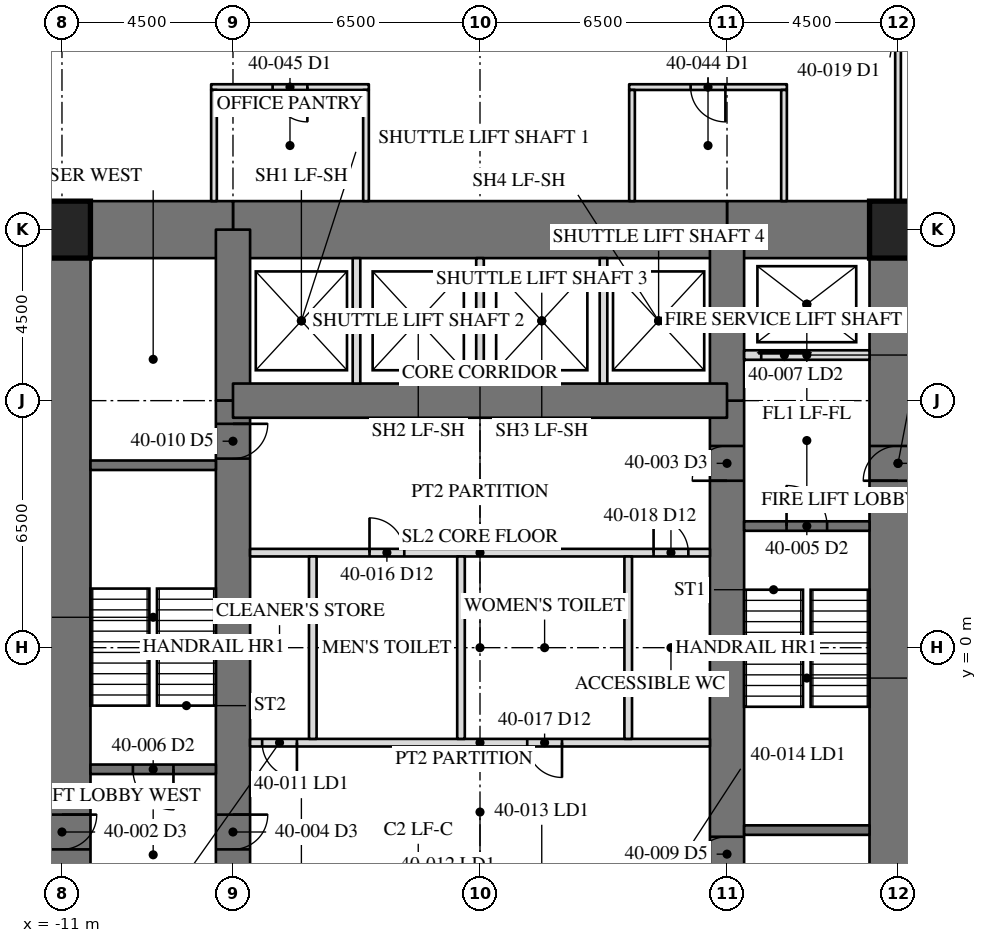
"""IFC4 building model, lengths in metres.
Left out: names, types, materials, properties, quantities, classifications, styles, units other than length and angle.
Written with IfcOpenShell. Run it as: python <this file> out.ifc"""

import sys

from ifc_helpers import new_model, si_unit, direction, frame, frame_2d, origin, origin_2d, place, context, subcontext, project, spatial, rectangle, hollow_rectangle, extrude, element, fill, save


model = new_model("IFC4")
c1 = context("Model", 3, precision=1e-05, world=origin(), true_north=direction((0.0, 1.0)))
c2 = subcontext(c1, "Body", "Model", "MODEL_VIEW")
j1 = project(units=[si_unit("LENGTHUNIT", "METRE"), si_unit("PLANEANGLEUNIT", "RADIAN")], contexts=[c1])
p1 = place(None, origin())
s1 = spatial("IfcSite", under=j1, at=p1, CompositionType="ELEMENT")
p2 = place(p1, origin())
s2 = spatial("IfcBuilding", under=s1, at=p2, CompositionType="ELEMENT")
p3 = place(p2, frame((0.0, 0.0, 170.5)))
s3 = spatial("IfcBuildingStorey", under=s2, at=p3, CompositionType="ELEMENT", Elevation=170.5)
p4 = place(p3, frame((11.0, -11.0, 0.0), z_axis=(0.0, 0.0, 1.0), x_axis=(0.0, 1.0, 0.0)))
e1 = element("IfcWall", 1, at=p4, inside=s3, PredefinedType="SHEAR", context=c2, shape_type="SweptSolid", body=[
    extrude(rectangle(XDim=22.0, YDim=1.5, at=frame_2d((11.0, 0.0))), origin(), (0.0, 0.0, 1.0), 4.1),
])
p5 = place(p4, frame((15.393, 0.0, 0.0)))
e2 = element("IfcOpeningElement", 2, at=p5, cuts=e1, PredefinedType="OPENING", context=c2, shape_type="SweptSolid", body=[
    extrude(rectangle(XDim=0.915, YDim=2.134, at=frame_2d((0.458, 1.067))), frame((0.0, 0.76, 0.0), z_axis=(0.0, -1.0, 0.0), x_axis=(1.0, 0.0, 0.0)), (0.0, 0.0, 1.0), 1.52),
])
p6 = place(p3, frame((-11.0, 11.0, 0.0), z_axis=(0.0, 0.0, 1.0), x_axis=(0.0, -1.0, 0.0)))
e3 = element("IfcWall", 3, at=p6, inside=s3, PredefinedType="SHEAR", context=c2, shape_type="SweptSolid", body=[
    extrude(rectangle(XDim=22.0, YDim=1.5, at=frame_2d((11.0, 0.0))), origin(), (0.0, 0.0, 1.0), 4.1),
])
p7 = place(p6, frame((15.393, 0.0, 0.0)))
e4 = element("IfcOpeningElement", 4, at=p7, cuts=e3, PredefinedType="OPENING", context=c2, shape_type="SweptSolid", body=[
    extrude(rectangle(XDim=0.915, YDim=2.134, at=frame_2d((0.458, 1.067))), frame((0.0, 0.76, 0.0), z_axis=(0.0, -1.0, 0.0), x_axis=(1.0, 0.0, 0.0)), (0.0, 0.0, 1.0), 1.52),
])
p8 = place(p3, frame((11.0, 11.0, 0.0), z_axis=(0.0, 0.0, 1.0), x_axis=(-1.0, 0.0, 0.0)))
e5 = element("IfcWall", 5, at=p8, inside=s3, PredefinedType="SHEAR", context=c2, shape_type="SweptSolid", body=[
    extrude(rectangle(XDim=4.5, YDim=1.5, at=frame_2d((2.25, 0.0))), origin(), (0.0, 0.0, 1.0), 4.1),
])
p9 = place(p3, frame((6.5, 11.0, 0.0), z_axis=(0.0, 0.0, 1.0), x_axis=(-1.0, 0.0, 0.0)))
e6 = element("IfcWall", 6, at=p9, inside=s3, PredefinedType="SHEAR", context=c2, shape_type="SweptSolid", body=[
    extrude(rectangle(XDim=13.0, YDim=1.5, at=frame_2d((6.5, 0.0))), origin(), (0.0, 0.0, 1.0), 4.1),
])
p10 = place(p3, frame((-6.5, 11.0, 0.0), z_axis=(0.0, 0.0, 1.0), x_axis=(-1.0, 0.0, 0.0)))
e7 = element("IfcWall", 7, at=p10, inside=s3, PredefinedType="SHEAR", context=c2, shape_type="SweptSolid", body=[
    extrude(rectangle(XDim=4.5, YDim=1.5, at=frame_2d((2.25, 0.0))), origin(), (0.0, 0.0, 1.0), 4.1),
])
p11 = place(p3, frame((6.5, -6.5, 0.0), z_axis=(0.0, 0.0, 1.0), x_axis=(0.0, 1.0, 0.0)))
e8 = element("IfcWall", 8, at=p11, inside=s3, PredefinedType="SHEAR", context=c2, shape_type="SweptSolid", body=[
    extrude(rectangle(XDim=13.0, YDim=0.9, at=frame_2d((6.5, 0.0))), origin(), (0.0, 0.0, 1.0), 4.1),
])
p12 = place(p11, frame((10.893, 0.0, 0.0)))
e9 = element("IfcOpeningElement", 9, at=p12, cuts=e8, PredefinedType="OPENING", context=c2, shape_type="SweptSolid", body=[
    extrude(rectangle(XDim=0.915, YDim=2.134, at=frame_2d((0.458, 1.067))), frame((0.0, 0.46, 0.0), z_axis=(0.0, -1.0, 0.0), x_axis=(1.0, 0.0, 0.0)), (0.0, 0.0, 1.0), 0.92),
])
p13 = place(p11, frame((0.61, 0.0, 0.0)))
e10 = element("IfcOpeningElement", 10, at=p13, cuts=e8, PredefinedType="OPENING", context=c2, shape_type="SweptSolid", body=[
    extrude(rectangle(XDim=0.915, YDim=2.134, at=frame_2d((0.458, 1.067))), frame((0.0, 0.46, 0.0), z_axis=(0.0, -1.0, 0.0), x_axis=(1.0, 0.0, 0.0)), (0.0, 0.0, 1.0), 0.92),
])
for number, where, z_axis, x_axis in (
    (11, (6.5, 6.5, 0.0), (0.0, 0.0, 1.0), (0.0, 1.0, 0.0)),
    (12, (-6.5, 11.0, 0.0), (0.0, 0.0, 1.0), (0.0, -1.0, 0.0)),
):
    element("IfcWall", number, at=place(p3, frame(where, z_axis=z_axis, x_axis=x_axis)), inside=s3, PredefinedType="SHEAR", context=c2, shape_type="SweptSolid", body=[
        extrude(rectangle(XDim=4.5, YDim=0.9, at=frame_2d((2.25, 0.0))), origin(), (0.0, 0.0, 1.0), 4.1),
    ])
p14 = place(p3, frame((-6.5, 6.5, 0.0), z_axis=(0.0, 0.0, 1.0), x_axis=(0.0, -1.0, 0.0)))
e13 = element("IfcWall", 13, at=p14, inside=s3, PredefinedType="SHEAR", context=c2, shape_type="SweptSolid", body=[
    extrude(rectangle(XDim=13.0, YDim=0.9, at=frame_2d((6.5, 0.0))), origin(), (0.0, 0.0, 1.0), 4.1),
])
p15 = place(p14, frame((10.893, 0.0, 0.0)))
e14 = element("IfcOpeningElement", 14, at=p15, cuts=e13, PredefinedType="OPENING", context=c2, shape_type="SweptSolid", body=[
    extrude(rectangle(XDim=0.915, YDim=2.134, at=frame_2d((0.458, 1.067))), frame((0.0, 0.46, 0.0), z_axis=(0.0, -1.0, 0.0), x_axis=(1.0, 0.0, 0.0)), (0.0, 0.0, 1.0), 0.92),
])
p16 = place(p14, frame((0.61, 0.0, 0.0)))
e15 = element("IfcOpeningElement", 15, at=p16, cuts=e13, PredefinedType="OPENING", context=c2, shape_type="SweptSolid", body=[
    extrude(rectangle(XDim=0.915, YDim=2.134, at=frame_2d((0.458, 1.067))), frame((0.0, 0.46, 0.0), z_axis=(0.0, -1.0, 0.0), x_axis=(1.0, 0.0, 0.0)), (0.0, 0.0, 1.0), 0.92),
])
p17 = place(p3, frame((6.5, 6.5, 0.0), z_axis=(0.0, 0.0, 1.0), x_axis=(-1.0, 0.0, 0.0)))
e16 = element("IfcWall", 16, at=p17, inside=s3, PredefinedType="SHEAR", context=c2, shape_type="SweptSolid", body=[
    extrude(rectangle(XDim=13.0, YDim=0.9, at=frame_2d((6.5, 0.0))), origin(), (0.0, 0.0, 1.0), 4.1),
])
for number, where, z_axis, x_axis in (
    (17, (11.0, 11.0, 0.0), (0.0, 0.0, 1.0), (1.0, 0.0, 0.0)),
    (18, (-11.0, 11.0, 0.0), (0.0, 0.0, 1.0), (1.0, 0.0, 0.0)),
):
    element("IfcColumn", number, at=place(p3, frame(where, z_axis=z_axis, x_axis=x_axis)), inside=s3, PredefinedType="COLUMN", context=c2, shape_type="SweptSolid", body=[
        extrude(hollow_rectangle(XDim=1.499, YDim=1.499, WallThickness=0.102, at=origin_2d()), origin(), (0.0, 0.0, 1.0), 4.1),
    ])
for number, where, z_axis, x_axis in (
    (19, (6.95, -4.8, 0.0), (0.0, 0.0, 1.0), (1.0, 0.0, 0.0)),
    (20, (-6.95, 4.8, 0.0), (0.0, 0.0, 1.0), (-1.0, 0.0, 0.0)),
):
    element("IfcWall", number, at=place(p3, frame(where, z_axis=z_axis, x_axis=x_axis)), inside=s3, PredefinedType="SOLIDWALL", context=c2, shape_type="SweptSolid", body=[
        extrude(rectangle(XDim=3.3, YDim=0.25, at=frame_2d((1.65, 0.0))), origin(), (0.0, 0.0, 1.0), 3.91),
    ])
p18 = place(p3, frame((6.95, 3.2, 0.0), z_axis=(0.0, 0.0, 1.0), x_axis=(1.0, 0.0, 0.0)))
e21 = element("IfcWall", 21, at=p18, inside=s3, PredefinedType="SOLIDWALL", context=c2, shape_type="SweptSolid", body=[
    extrude(rectangle(XDim=3.3, YDim=0.25, at=frame_2d((1.65, 0.0))), origin(), (0.0, 0.0, 1.0), 3.91),
])
p19 = place(p18, frame((1.116, 0.0, 0.0)))
e22 = element("IfcOpeningElement", 22, at=p19, cuts=e21, PredefinedType="OPENING", context=c2, shape_type="SweptSolid", body=[
    extrude(rectangle(XDim=1.067, YDim=2.134, at=frame_2d((0.533, 1.067))), frame((0.0, 0.135, 0.0), z_axis=(0.0, -1.0, 0.0), x_axis=(1.0, 0.0, 0.0)), (0.0, 0.0, 1.0), 0.27),
])
p20 = place(p3, frame((-6.95, -3.2, 0.0), z_axis=(0.0, 0.0, 1.0), x_axis=(-1.0, 0.0, 0.0)))
e23 = element("IfcWall", 23, at=p20, inside=s3, PredefinedType="SOLIDWALL", context=c2, shape_type="SweptSolid", body=[
    extrude(rectangle(XDim=3.3, YDim=0.25, at=frame_2d((1.65, 0.0))), origin(), (0.0, 0.0, 1.0), 3.91),
])
p21 = place(p20, frame((1.116, 0.0, 0.0)))
e24 = element("IfcOpeningElement", 24, at=p21, cuts=e23, PredefinedType="OPENING", context=c2, shape_type="SweptSolid", body=[
    extrude(rectangle(XDim=1.067, YDim=2.134, at=frame_2d((0.533, 1.067))), frame((0.0, 0.135, 0.0), z_axis=(0.0, -1.0, 0.0), x_axis=(1.0, 0.0, 0.0)), (0.0, 0.0, 1.0), 0.27),
])
p22 = place(p3, frame((6.95, 7.7, 0.0), z_axis=(0.0, 0.0, 1.0), x_axis=(1.0, 0.0, 0.0)))
e25 = element("IfcWall", 25, at=p22, inside=s3, PredefinedType="PARTITIONING", context=c2, shape_type="SweptSolid", body=[
    extrude(rectangle(XDim=3.3, YDim=0.25, at=frame_2d((1.65, 0.0))), origin(), (0.0, 0.0, 1.0), 3.91),
])
p23 = place(p22, frame((0.45, 0.0, 0.0)))
e26 = element("IfcOpeningElement", 26, at=p23, cuts=e25, PredefinedType="OPENING", context=c2, shape_type="SweptSolid", body=[
    extrude(rectangle(XDim=1.219, YDim=2.134, at=frame_2d((0.609, 1.067))), frame((0.0, 0.135, 0.0), z_axis=(0.0, -1.0, 0.0), x_axis=(1.0, 0.0, 0.0)), (0.0, 0.0, 1.0), 0.27),
])
p24 = place(p3, frame((-6.05, 2.5, 0.0), z_axis=(0.0, 0.0, 1.0), x_axis=(1.0, 0.0, 0.0)))
e27 = element("IfcWall", 27, at=p24, inside=s3, PredefinedType="PARTITIONING", context=c2, shape_type="SweptSolid", body=[
    extrude(rectangle(XDim=12.1, YDim=0.2, at=frame_2d((6.05, 0.0))), origin(), (0.0, 0.0, 1.0), 3.91),
])
p25 = place(p24, frame((3.143, 0.0, 0.0)))
e28 = element("IfcOpeningElement", 28, at=p25, cuts=e27, PredefinedType="OPENING", context=c2, shape_type="SweptSolid", body=[
    extrude(rectangle(XDim=0.915, YDim=2.134, at=frame_2d((0.458, 1.067))), frame((0.0, 0.11, 0.0), z_axis=(0.0, -1.0, 0.0), x_axis=(1.0, 0.0, 0.0)), (0.0, 0.0, 1.0), 0.22),
])
p26 = place(p24, frame((10.617, 0.0, 0.0)))
e29 = element("IfcOpeningElement", 29, at=p26, cuts=e27, PredefinedType="OPENING", context=c2, shape_type="SweptSolid", body=[
    extrude(rectangle(XDim=0.915, YDim=2.134, at=frame_2d((0.458, 1.067))), frame((0.0, 0.11, 0.0), z_axis=(0.0, -1.0, 0.0), x_axis=(1.0, 0.0, 0.0)), (0.0, 0.0, 1.0), 0.22),
])
p27 = place(p3, frame((6.05, -2.5, 0.0), z_axis=(0.0, 0.0, 1.0), x_axis=(-1.0, 0.0, 0.0)))
e30 = element("IfcWall", 30, at=p27, inside=s3, PredefinedType="PARTITIONING", context=c2, shape_type="SweptSolid", body=[
    extrude(rectangle(XDim=12.1, YDim=0.2, at=frame_2d((6.05, 0.0))), origin(), (0.0, 0.0, 1.0), 3.91),
])
p28 = place(p27, frame((10.867, 0.0, 0.0)))
e31 = element("IfcOpeningElement", 31, at=p28, cuts=e30, PredefinedType="OPENING", context=c2, shape_type="SweptSolid", body=[
    extrude(rectangle(XDim=0.915, YDim=2.134, at=frame_2d((0.458, 1.067))), frame((0.0, 0.11, 0.0), z_axis=(0.0, -1.0, 0.0), x_axis=(1.0, 0.0, 0.0)), (0.0, 0.0, 1.0), 0.22),
])
p29 = place(p27, frame((3.893, 0.0, 0.0)))
e32 = element("IfcOpeningElement", 32, at=p29, cuts=e30, PredefinedType="OPENING", context=c2, shape_type="SweptSolid", body=[
    extrude(rectangle(XDim=0.915, YDim=2.134, at=frame_2d((0.458, 1.067))), frame((0.0, 0.11, 0.0), z_axis=(0.0, -1.0, 0.0), x_axis=(1.0, 0.0, 0.0)), (0.0, 0.0, 1.0), 0.22),
])
for number, where, z_axis, x_axis in (
    (33, (-3.25, 6.95, 0.0), (0.0, 0.0, 1.0), (0.0, 1.0, 0.0)),
    (34, (0.0, 6.95, 0.0), (0.0, 0.0, 1.0), (0.0, 1.0, 0.0)),
    (35, (3.25, 6.95, 0.0), (0.0, 0.0, 1.0), (0.0, 1.0, 0.0)),
):
    element("IfcWall", number, at=place(p3, frame(where, z_axis=z_axis, x_axis=x_axis)), inside=s3, PredefinedType="PARTITIONING", context=c2, shape_type="SweptSolid", body=[
        extrude(rectangle(XDim=3.3, YDim=0.2, at=frame_2d((1.65, 0.0))), origin(), (0.0, 0.0, 1.0), 3.91),
    ])
for number, where, z_axis, x_axis in (
    (36, (-4.4, -2.4, 0.0), (0.0, 0.0, 1.0), (0.0, 1.0, 0.0)),
    (37, (-0.5, -2.4, 0.0), (0.0, 0.0, 1.0), (0.0, 1.0, 0.0)),
    (38, (3.9, -2.4, 0.0), (0.0, 0.0, 1.0), (0.0, 1.0, 0.0)),
):
    element("IfcWall", number, at=place(p3, frame(where, z_axis=z_axis, x_axis=x_axis)), inside=s3, PredefinedType="PARTITIONING", context=c2, shape_type="SweptSolid", body=[
        extrude(rectangle(XDim=4.8, YDim=0.2, at=frame_2d((2.4, 0.0))), origin(), (0.0, 0.0, 1.0), 3.91),
    ])
p30 = place(p3, frame((11.0, 11.75, 0.0), z_axis=(0.0, 0.0, 1.0), x_axis=(0.0, 1.0, 0.0)))
e39 = element("IfcWall", 39, at=p30, inside=s3, PredefinedType="PARTITIONING", context=c2, shape_type="SweptSolid", body=[
    extrude(rectangle(XDim=10.665, YDim=0.15, at=frame_2d((5.333, 0.0))), origin(), (0.0, 0.0, 1.0), 3.326),
])
p31 = place(p30, frame((4.518, 0.0, 0.0)))
e40 = element("IfcOpeningElement", 40, at=p31, cuts=e39, PredefinedType="OPENING", context=c2, shape_type="SweptSolid", body=[
    extrude(rectangle(XDim=0.915, YDim=2.134, at=frame_2d((0.458, 1.067))), frame((0.0, 0.085, 0.0), z_axis=(0.0, -1.0, 0.0), x_axis=(1.0, 0.0, 0.0)), (0.0, 0.0, 1.0), 0.17),
])
p32 = place(p3, frame((8.075, 14.75, 0.0), z_axis=(0.0, 0.0, 1.0), x_axis=(-1.0, 0.0, 0.0)))
e41 = element("IfcWall", 41, at=p32, inside=s3, PredefinedType="PARTITIONING", context=c2, shape_type="SweptSolid", body=[
    extrude(rectangle(XDim=4.15, YDim=0.15, at=frame_2d((2.075, 0.0))), origin(), (0.0, 0.0, 1.0), 3.91),
])
p33 = place(p32, frame((1.617, 0.0, 0.0)))
e42 = element("IfcOpeningElement", 42, at=p33, cuts=e41, PredefinedType="OPENING", context=c2, shape_type="SweptSolid", body=[
    extrude(rectangle(XDim=0.915, YDim=2.134, at=frame_2d((0.458, 1.067))), frame((0.0, 0.085, 0.0), z_axis=(0.0, -1.0, 0.0), x_axis=(1.0, 0.0, 0.0)), (0.0, 0.0, 1.0), 0.17),
])
for number, where, z_axis, x_axis in (
    (43, (8.0, 14.675, 0.0), (0.0, 0.0, 1.0), (0.0, -1.0, 0.0)),
    (44, (4.0, 14.675, 0.0), (0.0, 0.0, 1.0), (0.0, -1.0, 0.0)),
):
    element("IfcWall", number, at=place(p3, frame(where, z_axis=z_axis, x_axis=x_axis)), inside=s3, PredefinedType="PARTITIONING", context=c2, shape_type="SweptSolid", body=[
        extrude(rectangle(XDim=2.925, YDim=0.15, at=frame_2d((1.462, 0.0))), origin(), (0.0, 0.0, 1.0), 3.91),
    ])
p34 = place(p3, frame((-2.925, 14.75, 0.0), z_axis=(0.0, 0.0, 1.0), x_axis=(-1.0, 0.0, 0.0)))
e45 = element("IfcWall", 45, at=p34, inside=s3, PredefinedType="PARTITIONING", context=c2, shape_type="SweptSolid", body=[
    extrude(rectangle(XDim=4.15, YDim=0.15, at=frame_2d((2.075, 0.0))), origin(), (0.0, 0.0, 1.0), 3.91),
])
p35 = place(p34, frame((1.617, 0.0, 0.0)))
e46 = element("IfcOpeningElement", 46, at=p35, cuts=e45, PredefinedType="OPENING", context=c2, shape_type="SweptSolid", body=[
    extrude(rectangle(XDim=0.915, YDim=2.134, at=frame_2d((0.458, 1.067))), frame((0.0, 0.085, 0.0), z_axis=(0.0, -1.0, 0.0), x_axis=(1.0, 0.0, 0.0)), (0.0, 0.0, 1.0), 0.17),
])
for number, where, z_axis, x_axis in (
    (47, (-3.0, 14.675, 0.0), (0.0, 0.0, 1.0), (0.0, -1.0, 0.0)),
    (48, (-7.0, 14.675, 0.0), (0.0, 0.0, 1.0), (0.0, -1.0, 0.0)),
):
    element("IfcWall", number, at=place(p3, frame(where, z_axis=z_axis, x_axis=x_axis)), inside=s3, PredefinedType="PARTITIONING", context=c2, shape_type="SweptSolid", body=[
        extrude(rectangle(XDim=2.925, YDim=0.15, at=frame_2d((1.462, 0.0))), origin(), (0.0, 0.0, 1.0), 3.91),
    ])
p36 = place(p12, origin())
e49 = element("IfcDoor", 49, at=p36, inside=s3, OperationType="SINGLE_SWING_RIGHT", PredefinedType="DOOR", context=c2, shape_type="SweptSolid", body=[
    extrude(rectangle(XDim=0.915, YDim=2.134, at=frame_2d((0.458, 1.067))), frame((0.0, -0.375, 0.0), z_axis=(0.0, -1.0, 0.0), x_axis=(1.0, 0.0, 0.0)), (0.0, 0.0, 1.0), 0.05),
])
fill(e9, e49)
p37 = place(p15, origin())
e50 = element("IfcDoor", 50, at=p37, inside=s3, OperationType="SINGLE_SWING_RIGHT", PredefinedType="DOOR", context=c2, shape_type="SweptSolid", body=[
    extrude(rectangle(XDim=0.915, YDim=2.134, at=frame_2d((0.458, 1.067))), frame((0.0, -0.375, 0.0), z_axis=(0.0, -1.0, 0.0), x_axis=(1.0, 0.0, 0.0)), (0.0, 0.0, 1.0), 0.05),
])
fill(e14, e50)
p38 = place(p19, origin())
e51 = element("IfcDoor", 51, at=p38, inside=s3, OperationType="SINGLE_SWING_LEFT", PredefinedType="DOOR", context=c2, shape_type="SweptSolid", body=[
    extrude(rectangle(XDim=1.067, YDim=2.134, at=frame_2d((0.533, 1.067))), frame((0.0, 0.025, 0.0), z_axis=(0.0, -1.0, 0.0), x_axis=(1.0, 0.0, 0.0)), (0.0, 0.0, 1.0), 0.05),
])
fill(e22, e51)
p39 = place(p21, origin())
e52 = element("IfcDoor", 52, at=p39, inside=s3, OperationType="SINGLE_SWING_LEFT", PredefinedType="DOOR", context=c2, shape_type="SweptSolid", body=[
    extrude(rectangle(XDim=1.067, YDim=2.134, at=frame_2d((0.533, 1.067))), frame((0.0, 0.025, 0.0), z_axis=(0.0, -1.0, 0.0), x_axis=(1.0, 0.0, 0.0)), (0.0, 0.0, 1.0), 0.05),
])
fill(e24, e52)
p40 = place(p23, origin())
e53 = element("IfcDoor", 53, at=p40, inside=s3, OperationType="SLIDING_TO_LEFT", PredefinedType="DOOR", context=c2, shape_type="SweptSolid", body=[
    extrude(rectangle(XDim=1.219, YDim=2.134, at=frame_2d((0.609, 1.067))), frame((0.0, 0.025, 0.0), z_axis=(0.0, -1.0, 0.0), x_axis=(1.0, 0.0, 0.0)), (0.0, 0.0, 1.0), 0.05),
])
fill(e26, e53)
p41 = place(p13, origin())
e54 = element("IfcDoor", 54, at=p41, inside=s3, OperationType="SINGLE_SWING_RIGHT", PredefinedType="DOOR", context=c2, shape_type="SweptSolid", body=[
    extrude(rectangle(XDim=0.915, YDim=2.134, at=frame_2d((0.458, 1.067))), frame((0.0, -0.375, 0.0), z_axis=(0.0, -1.0, 0.0), x_axis=(1.0, 0.0, 0.0)), (0.0, 0.0, 1.0), 0.05),
])
fill(e10, e54)
p42 = place(p16, origin())
e55 = element("IfcDoor", 55, at=p42, inside=s3, OperationType="SINGLE_SWING_RIGHT", PredefinedType="DOOR", context=c2, shape_type="SweptSolid", body=[
    extrude(rectangle(XDim=0.915, YDim=2.134, at=frame_2d((0.458, 1.067))), frame((0.0, -0.375, 0.0), z_axis=(0.0, -1.0, 0.0), x_axis=(1.0, 0.0, 0.0)), (0.0, 0.0, 1.0), 0.05),
])
fill(e15, e55)
p43 = place(p28, origin())
e56 = element("IfcDoor", 56, at=p43, inside=s3, OperationType="SINGLE_SWING_RIGHT", PredefinedType="DOOR", context=c2, shape_type="SweptSolid", body=[
    extrude(rectangle(XDim=0.915, YDim=2.134, at=frame_2d((0.458, 1.067))), frame((0.0, 0.025, 0.0), z_axis=(0.0, -1.0, 0.0), x_axis=(1.0, 0.0, 0.0)), (0.0, 0.0, 1.0), 0.05),
])
fill(e31, e56)
p44 = place(p25, origin())
e57 = element("IfcDoor", 57, at=p44, inside=s3, OperationType="SINGLE_SWING_LEFT", PredefinedType="DOOR", context=c2, shape_type="SweptSolid", body=[
    extrude(rectangle(XDim=0.915, YDim=2.134, at=frame_2d((0.458, 1.067))), frame((0.0, 0.025, 0.0), z_axis=(0.0, -1.0, 0.0), x_axis=(1.0, 0.0, 0.0)), (0.0, 0.0, 1.0), 0.05),
])
fill(e28, e57)
p45 = place(p29, origin())
e58 = element("IfcDoor", 58, at=p45, inside=s3, OperationType="SINGLE_SWING_LEFT", PredefinedType="DOOR", context=c2, shape_type="SweptSolid", body=[
    extrude(rectangle(XDim=0.915, YDim=2.134, at=frame_2d((0.458, 1.067))), frame((0.0, 0.025, 0.0), z_axis=(0.0, -1.0, 0.0), x_axis=(1.0, 0.0, 0.0)), (0.0, 0.0, 1.0), 0.05),
])
fill(e32, e58)
p46 = place(p26, origin())
e59 = element("IfcDoor", 59, at=p46, inside=s3, OperationType="SINGLE_SWING_LEFT", PredefinedType="DOOR", context=c2, shape_type="SweptSolid", body=[
    extrude(rectangle(XDim=0.915, YDim=2.134, at=frame_2d((0.458, 1.067))), frame((0.0, 0.025, 0.0), z_axis=(0.0, -1.0, 0.0), x_axis=(1.0, 0.0, 0.0)), (0.0, 0.0, 1.0), 0.05),
])
fill(e29, e59)
p47 = place(p33, origin())
e60 = element("IfcDoor", 60, at=p47, inside=s3, OperationType="SINGLE_SWING_LEFT", PredefinedType="DOOR", context=c2, shape_type="SweptSolid", body=[
    extrude(rectangle(XDim=0.915, YDim=2.134, at=frame_2d((0.458, 1.067))), frame((0.0, 0.025, 0.0), z_axis=(0.0, -1.0, 0.0), x_axis=(1.0, 0.0, 0.0)), (0.0, 0.0, 1.0), 0.05),
])
fill(e42, e60)
p48 = place(p35, origin())
e61 = element("IfcDoor", 61, at=p48, inside=s3, OperationType="SINGLE_SWING_LEFT", PredefinedType="DOOR", context=c2, shape_type="SweptSolid", body=[
    extrude(rectangle(XDim=0.915, YDim=2.134, at=frame_2d((0.458, 1.067))), frame((0.0, 0.025, 0.0), z_axis=(0.0, -1.0, 0.0), x_axis=(1.0, 0.0, 0.0)), (0.0, 0.0, 1.0), 0.05),
])
fill(e46, e61)
save(model, sys.argv[1])
